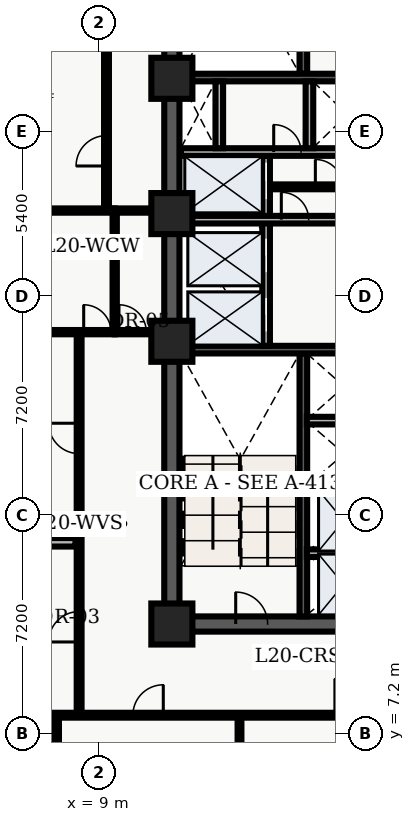
"""IFC4 building model, lengths in metres.
Left out: names, types, materials, properties, quantities, classifications, styles, units other than length and angle.
Written with IfcOpenShell. Run it as: python <this file> out.ifc"""

import sys

from ifc_helpers import new_model, entity, si_unit, converted_unit, direction, frame, origin_with_axes, origin_2d_with_axis, place, context, subcontext, project, spatial, polyline, rectangle, outline, extrude, element, fill, save


model = new_model("IFC4")
c1 = context("Model", 3, precision=1e-05, world=origin_with_axes(), true_north=direction((0.0, 1.0)))
c2 = subcontext(c1, "Body", "Model", "MODEL_VIEW")
j1 = project(units=[si_unit("LENGTHUNIT", "METRE"), converted_unit("PLANEANGLEUNIT", "DEGREE", entity("IfcPlaneAngleMeasure", 0.017), si_unit("PLANEANGLEUNIT", "RADIAN"), dimensions=[0, 0, 0, 0, 0, 0, 0])], contexts=[c1])
p1 = place(None, origin_with_axes())
s1 = spatial("IfcSite", under=j1, at=p1, CompositionType="ELEMENT")
p2 = place(p1, origin_with_axes())
s2 = spatial("IfcBuilding", under=s1, at=p2, CompositionType="ELEMENT")
p3 = place(p2, frame((0.0, 0.0, 84.6), z_axis=(0.0, 0.0, 1.0), x_axis=(1.0, 0.0, 0.0)))
s3 = spatial("IfcBuildingStorey", under=s2, at=p3, CompositionType="ELEMENT", Elevation=84.6)
p4 = place(p3, frame((11.4, 10.8, 0.0), z_axis=(0.0, 0.0, 1.0), x_axis=(0.0, 1.0, 0.0)))
e1 = element("IfcWall", 1, at=p4, inside=s3, PredefinedType="SHEAR", context=c2, shape_type="SweptSolid", body=[
    extrude(outline(polyline([(0.0, -0.25), (27.0, -0.25), (27.0, 0.25), (0.0, 0.25), (0.0, -0.25)])), origin_with_axes(), (0.0, 0.0, 1.0), 4.26),
])
p5 = place(p3, frame((11.4, 10.8, 0.0), z_axis=(0.0, 0.0, 1.0), x_axis=(1.0, 0.0, 0.0)))
e2 = element("IfcWall", 2, at=p5, inside=s3, PredefinedType="SHEAR", context=c2, shape_type="SweptSolid", body=[
    extrude(outline(polyline([(0.0, -0.25), (7.2, -0.25), (7.2, 0.25), (0.0, 0.25), (0.0, -0.25)])), origin_with_axes(), (0.0, 0.0, 1.0), 4.26),
])
p6 = place(p5, frame((2.625, 0.0, 0.0), z_axis=(0.0, 0.0, 1.0), x_axis=(1.0, 0.0, 0.0)))
e3 = element("IfcOpeningElement", 3, at=p6, cuts=e2, PredefinedType="OPENING", context=c2, shape_type="SweptSolid", body=[
    extrude(rectangle(XDim=1.05, YDim=0.52, at=origin_2d_with_axis()), origin_with_axes(), (0.0, 0.0, 1.0), 2.15),
])
p7 = place(p3, frame((15.725, 11.05, 0.0), z_axis=(0.0, 0.0, 1.0), x_axis=(0.0, 1.0, 0.0)))
e4 = element("IfcWall", 4, at=p7, inside=s3, PredefinedType="SHEAR", context=c2, shape_type="SweptSolid", body=[
    extrude(outline(polyline([(0.0, -0.125), (8.65, -0.125), (8.65, 0.125), (0.0, 0.125), (0.0, -0.125)])), origin_with_axes(), (0.0, 0.0, 1.0), 4.26),
])
p8 = place(p3, frame((11.65, 19.825, 0.0), z_axis=(0.0, 0.0, 1.0), x_axis=(1.0, 0.0, 0.0)))
e5 = element("IfcWall", 5, at=p8, inside=s3, PredefinedType="SHEAR", context=c2, shape_type="SweptSolid", body=[
    extrude(outline(polyline([(0.0, -0.125), (6.7, -0.125), (6.7, 0.125), (0.0, 0.125), (0.0, -0.125)])), origin_with_axes(), (0.0, 0.0, 1.0), 4.26),
])
p9 = place(p3, frame((15.725, 28.9, 0.0), z_axis=(0.0, 0.0, 1.0), x_axis=(0.0, 1.0, 0.0)))
e6 = element("IfcWall", 6, at=p9, inside=s3, PredefinedType="SHEAR", context=c2, shape_type="SweptSolid", body=[
    extrude(outline(polyline([(0.0, -0.125), (8.65, -0.125), (8.65, 0.125), (0.0, 0.125), (0.0, -0.125)])), origin_with_axes(), (0.0, 0.0, 1.0), 4.26),
])
p10 = place(p3, frame((11.65, 28.775, 0.0), z_axis=(0.0, 0.0, 1.0), x_axis=(1.0, 0.0, 0.0)))
e7 = element("IfcWall", 7, at=p10, inside=s3, PredefinedType="SHEAR", context=c2, shape_type="SweptSolid", body=[
    extrude(outline(polyline([(0.0, -0.125), (6.7, -0.125), (6.7, 0.125), (0.0, 0.125), (0.0, -0.125)])), origin_with_axes(), (0.0, 0.0, 1.0), 4.26),
])
p11 = place(p3, frame((14.5, 19.95, 0.0), z_axis=(0.0, 0.0, 1.0), x_axis=(0.0, 1.0, 0.0)))
e8 = element("IfcWall", 8, at=p11, inside=s3, PredefinedType="SOLIDWALL", context=c2, shape_type="SweptSolid", body=[
    extrude(outline(polyline([(0.0, -0.125), (6.25, -0.125), (6.25, 0.125), (0.0, 0.125), (0.0, -0.125)])), origin_with_axes(), (0.0, 0.0, 1.0), 3.3),
])
p12 = place(p11, frame((1.025, 0.0, 0.0), z_axis=(0.0, 0.0, 1.0), x_axis=(1.0, 0.0, 0.0)))
e9 = element("IfcOpeningElement", 9, at=p12, cuts=e8, PredefinedType="OPENING", context=c2, shape_type="SweptSolid", body=[
    extrude(rectangle(XDim=1.1, YDim=0.27, at=origin_2d_with_axis()), origin_with_axes(), (0.0, 0.0, 1.0), 2.15),
])
p13 = place(p11, frame((2.975, 0.0, 0.0), z_axis=(0.0, 0.0, 1.0), x_axis=(1.0, 0.0, 0.0)))
e10 = element("IfcOpeningElement", 10, at=p13, cuts=e8, PredefinedType="OPENING", context=c2, shape_type="SweptSolid", body=[
    extrude(rectangle(XDim=1.1, YDim=0.27, at=origin_2d_with_axis()), origin_with_axes(), (0.0, 0.0, 1.0), 2.15),
])
p14 = place(p11, frame((5.425, 0.0, 0.0), z_axis=(0.0, 0.0, 1.0), x_axis=(1.0, 0.0, 0.0)))
e11 = element("IfcOpeningElement", 11, at=p14, cuts=e8, PredefinedType="OPENING", context=c2, shape_type="SweptSolid", body=[
    extrude(rectangle(XDim=1.2, YDim=0.27, at=origin_2d_with_axis()), origin_with_axes(), (0.0, 0.0, 1.0), 2.15),
])
p15 = place(p3, frame((11.7, 24.1, 0.0), z_axis=(0.0, 0.0, 1.0), x_axis=(1.0, 0.0, 0.0)))
e12 = element("IfcWall", 12, at=p15, inside=s3, PredefinedType="SOLIDWALL", context=c2, shape_type="SweptSolid", body=[
    extrude(outline(polyline([(0.0, -0.125), (6.6, -0.125), (6.6, 0.125), (0.0, 0.125), (0.0, -0.125)])), origin_with_axes(), (0.0, 0.0, 1.0), 3.3),
])
p16 = place(p15, frame((3.75, 0.0, 0.0), z_axis=(0.0, 0.0, 1.0), x_axis=(1.0, 0.0, 0.0)))
e13 = element("IfcOpeningElement", 13, at=p16, cuts=e12, PredefinedType="OPENING", context=c2, shape_type="SweptSolid", body=[
    extrude(rectangle(XDim=0.9, YDim=0.27, at=origin_2d_with_axis()), origin_with_axes(), (0.0, 0.0, 1.0), 2.15),
])
p17 = place(p3, frame((11.7, 26.325, 0.0), z_axis=(0.0, 0.0, 1.0), x_axis=(1.0, 0.0, 0.0)))
e14 = element("IfcWall", 14, at=p17, inside=s3, PredefinedType="SOLIDWALL", context=c2, shape_type="SweptSolid", body=[
    extrude(outline(polyline([(0.0, -0.125), (6.6, -0.125), (6.6, 0.125), (0.0, 0.125), (0.0, -0.125)])), origin_with_axes(), (0.0, 0.0, 1.0), 3.3),
])
p18 = place(p17, frame((3.5, 0.0, 0.0), z_axis=(0.0, 0.0, 1.0), x_axis=(1.0, 0.0, 0.0)))
e15 = element("IfcOpeningElement", 15, at=p18, cuts=e14, PredefinedType="OPENING", context=c2, shape_type="SweptSolid", body=[
    extrude(rectangle(XDim=0.9, YDim=0.27, at=origin_2d_with_axis()), origin_with_axes(), (0.0, 0.0, 1.0), 2.15),
])
for number, where, z_axis, x_axis in (
    (16, (12.96, 26.45, 0.0), (0.0, 0.0, 1.0), (0.0, 1.0, 0.0)),
    (17, (15.925, 26.45, 0.0), (0.0, 0.0, 1.0), (0.0, 1.0, 0.0)),
):
    element("IfcWall", number, at=place(p3, frame(where, z_axis=z_axis, x_axis=x_axis)), inside=s3, PredefinedType="SOLIDWALL", context=c2, shape_type="SweptSolid", body=[
        extrude(outline(polyline([(0.0, -0.125), (2.2, -0.125), (2.2, 0.125), (0.0, 0.125), (0.0, -0.125)])), origin_with_axes(), (0.0, 0.0, 1.0), 3.3),
    ])
for number, where, z_axis, x_axis in (
    (18, (11.4, 10.8, 0.0), (0.0, 0.0, 1.0), (1.0, 0.0, 0.0)),
    (19, (11.4, 20.1, 0.0), (0.0, 0.0, 1.0), (1.0, 0.0, 0.0)),
    (20, (11.4, 24.3, 0.0), (0.0, 0.0, 1.0), (1.0, 0.0, 0.0)),
    (21, (11.4, 28.75, 0.0), (0.0, 0.0, 1.0), (1.0, 0.0, 0.0)),
):
    element("IfcColumn", number, at=place(p3, frame(where, z_axis=z_axis, x_axis=x_axis)), inside=s3, PredefinedType="COLUMN", context=c2, shape_type="SweptSolid", body=[
        extrude(rectangle(XDim=1.35, YDim=1.35, at=origin_2d_with_axis()), origin_with_axes(), (0.0, 0.0, 1.0), 4.5),
    ])
p19 = place(p3, frame((14.62, 25.18, 0.0), z_axis=(0.0, 0.0, 1.0), x_axis=(1.0, 0.0, 0.0)))
e22 = element("IfcWall", 22, at=p19, inside=s3, PredefinedType="PARTITIONING", context=c2, shape_type="SweptSolid", body=[
    extrude(outline(polyline([(0.0, -0.08), (3.68, -0.08), (3.68, 0.08), (0.0, 0.08), (0.0, -0.08)])), origin_with_axes(), (0.0, 0.0, 1.0), 3.2),
])
p20 = place(p19, frame((1.95, 0.0, 0.0), z_axis=(0.0, 0.0, 1.0), x_axis=(1.0, 0.0, 0.0)))
e23 = element("IfcOpeningElement", 23, at=p20, cuts=e22, PredefinedType="OPENING", context=c2, shape_type="SweptSolid", body=[
    extrude(rectangle(XDim=0.9, YDim=0.18, at=origin_2d_with_axis()), origin_with_axes(), (0.0, 0.0, 1.0), 2.15),
])
for number, where, z_axis, x_axis in (
    (24, (15.84, 13.13, 0.0), (0.0, 0.0, 1.0), (1.0, 0.0, 0.0)),
    (25, (15.84, 15.29, 0.0), (0.0, 0.0, 1.0), (1.0, 0.0, 0.0)),
    (26, (15.84, 17.49, 0.0), (0.0, 0.0, 1.0), (1.0, 0.0, 0.0)),
):
    element("IfcWall", number, at=place(p3, frame(where, z_axis=z_axis, x_axis=x_axis)), inside=s3, PredefinedType="SOLIDWALL", context=c2, shape_type="SweptSolid", body=[
        extrude(outline(polyline([(0.0, -0.125), (2.46, -0.125), (2.46, 0.125), (0.0, 0.125), (0.0, -0.125)])), origin_with_axes(), (0.0, 0.0, 1.0), 3.2),
    ])
p21 = place(p3, frame((9.52, 20.4, 0.0), z_axis=(0.0, 0.0, 1.0), x_axis=(0.0, 1.0, 0.0)))
e27 = element("IfcWall", 27, at=p21, inside=s3, PredefinedType="PARTITIONING", context=c2, shape_type="SweptSolid", body=[
    extrude(outline(polyline([(0.0, -0.07), (4.0, -0.07), (4.0, 0.07), (0.0, 0.07), (0.0, -0.07)])), origin_with_axes(), (0.0, 0.0, 1.0), 3.2),
])
p22 = place(p3, frame((9.52, 20.4, 0.0), z_axis=(0.0, 0.0, 1.0), x_axis=(1.0, 0.0, 0.0)))
e28 = element("IfcWall", 28, at=p22, inside=s3, PredefinedType="PARTITIONING", context=c2, shape_type="SweptSolid", body=[
    extrude(outline(polyline([(0.0, -0.07), (1.58, -0.07), (1.58, 0.07), (0.0, 0.07), (0.0, -0.07)])), origin_with_axes(), (0.0, 0.0, 1.0), 3.2),
])
p23 = place(p22, frame((0.59, 0.0, 0.0), z_axis=(0.0, 0.0, 1.0), x_axis=(1.0, 0.0, 0.0)))
e29 = element("IfcOpeningElement", 29, at=p23, cuts=e28, PredefinedType="OPENING", context=c2, shape_type="SweptSolid", body=[
    extrude(rectangle(XDim=0.9, YDim=0.16, at=origin_2d_with_axis()), origin_with_axes(), (0.0, 0.0, 1.0), 2.15),
])
p24 = place(p3, frame((9.52, 24.4, 0.0), z_axis=(0.0, 0.0, 1.0), x_axis=(1.0, 0.0, 0.0)))
e30 = element("IfcWall", 30, at=p24, inside=s3, PredefinedType="PARTITIONING", context=c2, shape_type="SweptSolid", body=[
    extrude(outline(polyline([(0.0, -0.07), (1.58, -0.07), (1.58, 0.07), (0.0, 0.07), (0.0, -0.07)])), origin_with_axes(), (0.0, 0.0, 1.0), 3.2),
])
p25 = place(p3, frame((2.6, 7.8, 0.0), z_axis=(0.0, 0.0, 1.0), x_axis=(1.0, 0.0, 0.0)))
e31 = element("IfcWall", 31, at=p25, inside=s3, PredefinedType="PARTITIONING", context=c2, shape_type="SweptSolid", body=[
    extrude(outline(polyline([(0.0, -0.08), (18.55, -0.08), (18.55, 0.08), (0.0, 0.08), (0.0, -0.08)])), origin_with_axes(), (0.0, 0.0, 1.0), 3.2),
])
p26 = place(p25, frame((2.501, 0.0, 0.0), z_axis=(0.0, 0.0, 1.0), x_axis=(1.0, 0.0, 0.0)))
e32 = element("IfcOpeningElement", 32, at=p26, cuts=e31, PredefinedType="OPENING", context=c2, shape_type="SweptSolid", body=[
    extrude(rectangle(XDim=1.0, YDim=0.18, at=origin_2d_with_axis()), origin_with_axes(), (0.0, 0.0, 1.0), 2.15),
])
p27 = place(p25, frame((8.018, 0.0, 0.0), z_axis=(0.0, 0.0, 1.0), x_axis=(1.0, 0.0, 0.0)))
e33 = element("IfcOpeningElement", 33, at=p27, cuts=e31, PredefinedType="OPENING", context=c2, shape_type="SweptSolid", body=[
    extrude(rectangle(XDim=1.0, YDim=0.18, at=origin_2d_with_axis()), origin_with_axes(), (0.0, 0.0, 1.0), 2.15),
])
p28 = place(p25, frame((14.762, 0.0, 0.0), z_axis=(0.0, 0.0, 1.0), x_axis=(1.0, 0.0, 0.0)))
e34 = element("IfcOpeningElement", 34, at=p28, cuts=e31, PredefinedType="OPENING", context=c2, shape_type="SweptSolid", body=[
    extrude(rectangle(XDim=1.2, YDim=0.18, at=origin_2d_with_axis()), origin_with_axes(), (0.0, 0.0, 1.0), 2.2),
])
p29 = place(p3, frame((8.35, 7.8, 0.0), z_axis=(0.0, 0.0, 1.0), x_axis=(0.0, 1.0, 0.0)))
e35 = element("IfcWall", 35, at=p29, inside=s3, PredefinedType="PARTITIONING", context=c2, shape_type="SweptSolid", body=[
    extrude(outline(polyline([(0.0, -0.08), (12.6, -0.08), (12.6, 0.08), (0.0, 0.08), (0.0, -0.08)])), origin_with_axes(), (0.0, 0.0, 1.0), 3.2),
])
p30 = place(p29, frame((2.909, 0.0, 0.0), z_axis=(0.0, 0.0, 1.0), x_axis=(1.0, 0.0, 0.0)))
e36 = element("IfcOpeningElement", 36, at=p30, cuts=e35, PredefinedType="OPENING", context=c2, shape_type="SweptSolid", body=[
    extrude(rectangle(XDim=1.0, YDim=0.18, at=origin_2d_with_axis()), origin_with_axes(), (0.0, 0.0, 1.0), 2.15),
])
p31 = place(p29, frame((9.104, 0.0, 0.0), z_axis=(0.0, 0.0, 1.0), x_axis=(1.0, 0.0, 0.0)))
e37 = element("IfcOpeningElement", 37, at=p31, cuts=e35, PredefinedType="OPENING", context=c2, shape_type="SweptSolid", body=[
    extrude(rectangle(XDim=1.0, YDim=0.18, at=origin_2d_with_axis()), origin_with_axes(), (0.0, 0.0, 1.0), 2.15),
])
p32 = place(p3, frame((9.25, 24.4, 0.0), z_axis=(0.0, 0.0, 1.0), x_axis=(0.0, 1.0, 0.0)))
e38 = element("IfcWall", 38, at=p32, inside=s3, PredefinedType="PARTITIONING", context=c2, shape_type="SweptSolid", body=[
    extrude(outline(polyline([(0.0, -0.08), (16.1, -0.08), (16.1, 0.08), (0.0, 0.08), (0.0, -0.08)])), origin_with_axes(), (0.0, 0.0, 1.0), 3.2),
])
p33 = place(p32, frame((1.966, 0.0, 0.0), z_axis=(0.0, 0.0, 1.0), x_axis=(1.0, 0.0, 0.0)))
e39 = element("IfcOpeningElement", 39, at=p33, cuts=e38, PredefinedType="OPENING", context=c2, shape_type="SweptSolid", body=[
    extrude(rectangle(XDim=1.0, YDim=0.18, at=origin_2d_with_axis()), origin_with_axes(), (0.0, 0.0, 1.0), 2.15),
])
p34 = place(p32, frame((11.001, 0.0, 0.0), z_axis=(0.0, 0.0, 1.0), x_axis=(1.0, 0.0, 0.0)))
e40 = element("IfcOpeningElement", 40, at=p34, cuts=e38, PredefinedType="OPENING", context=c2, shape_type="SweptSolid", body=[
    extrude(rectangle(XDim=1.0, YDim=0.18, at=origin_2d_with_axis()), origin_with_axes(), (0.0, 0.0, 1.0), 2.15),
])
p35 = place(p3, frame((0.36, 20.4, 0.0), z_axis=(0.0, 0.0, 1.0), x_axis=(1.0, 0.0, 0.0)))
e41 = element("IfcWall", 41, at=p35, inside=s3, PredefinedType="PARTITIONING", context=c2, shape_type="SweptSolid", body=[
    extrude(outline(polyline([(0.0, -0.07), (9.16, -0.07), (9.16, 0.07), (0.0, 0.07), (0.0, -0.07)])), origin_with_axes(), (0.0, 0.0, 1.0), 3.2),
])
p36 = place(p35, frame((8.59, 0.0, 0.0), z_axis=(0.0, 0.0, 1.0), x_axis=(1.0, 0.0, 0.0)))
e42 = element("IfcOpeningElement", 42, at=p36, cuts=e41, PredefinedType="OPENING", context=c2, shape_type="SweptSolid", body=[
    extrude(rectangle(XDim=0.9, YDim=0.16, at=origin_2d_with_axis()), origin_with_axes(), (0.0, 0.0, 1.0), 2.15),
])
p37 = place(p3, frame((0.36, 24.4, 0.0), z_axis=(0.0, 0.0, 1.0), x_axis=(1.0, 0.0, 0.0)))
e43 = element("IfcWall", 43, at=p37, inside=s3, PredefinedType="PARTITIONING", context=c2, shape_type="SweptSolid", body=[
    extrude(outline(polyline([(0.0, -0.07), (9.16, -0.07), (9.16, 0.07), (0.0, 0.07), (0.0, -0.07)])), origin_with_axes(), (0.0, 0.0, 1.0), 3.2),
])
p38 = place(p3, frame((0.375, 13.488, 0.0), z_axis=(0.0, 0.0, 1.0), x_axis=(1.0, 0.0, 0.0)))
e44 = element("IfcWall", 44, at=p38, inside=s3, PredefinedType="PARTITIONING", context=c2, shape_type="SweptSolid", body=[
    extrude(outline(polyline([(0.0, -0.14), (7.855, -0.14), (7.855, 0.14), (0.0, 0.14), (0.0, -0.14)])), origin_with_axes(), (0.0, 0.0, 1.0), 3.2),
])
p39 = place(p3, frame((7.611, 0.36, 0.0), z_axis=(0.0, 0.0, 1.0), x_axis=(0.0, 1.0, 0.0)))
e45 = element("IfcWall", 45, at=p39, inside=s3, PredefinedType="PARTITIONING", context=c2, shape_type="SweptSolid", body=[
    extrude(outline(polyline([(0.0, -0.075), (7.34, -0.075), (7.34, 0.075), (0.0, 0.075), (0.0, -0.075)])), origin_with_axes(), (0.0, 0.0, 1.0), 3.2),
])
p40 = place(p3, frame((13.625, 0.36, 0.0), z_axis=(0.0, 0.0, 1.0), x_axis=(0.0, 1.0, 0.0)))
e46 = element("IfcWall", 46, at=p40, inside=s3, PredefinedType="PARTITIONING", context=c2, shape_type="SweptSolid", body=[
    extrude(outline(polyline([(0.0, -0.062), (7.34, -0.062), (7.34, 0.062), (0.0, 0.062), (0.0, -0.062)])), origin_with_axes(), (0.0, 0.0, 1.0), 3.2),
])
p41 = place(p11, frame((1.025, 0.0, 0.0), z_axis=(0.0, 0.0, 1.0), x_axis=(1.0, 0.0, 0.0)))
e47 = element("IfcDoor", 47, at=p41, inside=s3, OperationType="SLIDING_TO_LEFT", PredefinedType="DOOR", context=c2, shape_type="SweptSolid", body=[
    extrude(rectangle(XDim=1.1, YDim=0.09, at=origin_2d_with_axis()), origin_with_axes(), (0.0, 0.0, 1.0), 2.15),
])
fill(e9, e47)
p42 = place(p11, frame((2.975, 0.0, 0.0), z_axis=(0.0, 0.0, 1.0), x_axis=(1.0, 0.0, 0.0)))
e48 = element("IfcDoor", 48, at=p42, inside=s3, OperationType="SLIDING_TO_RIGHT", PredefinedType="DOOR", context=c2, shape_type="SweptSolid", body=[
    extrude(rectangle(XDim=1.1, YDim=0.09, at=origin_2d_with_axis()), origin_with_axes(), (0.0, 0.0, 1.0), 2.15),
])
fill(e10, e48)
p43 = place(p11, frame((5.425, 0.0, 0.0), z_axis=(0.0, 0.0, 1.0), x_axis=(1.0, 0.0, 0.0)))
e49 = element("IfcDoor", 49, at=p43, inside=s3, OperationType="DOUBLE_DOOR_SLIDING", PredefinedType="DOOR", context=c2, shape_type="SweptSolid", body=[
    extrude(rectangle(XDim=1.2, YDim=0.09, at=origin_2d_with_axis()), origin_with_axes(), (0.0, 0.0, 1.0), 2.15),
])
fill(e11, e49)
p44 = place(p5, frame((2.625, 0.0, 0.0), z_axis=(0.0, 0.0, 1.0), x_axis=(1.0, 0.0, 0.0)))
e50 = element("IfcDoor", 50, at=p44, inside=s3, OperationType="SINGLE_SWING_LEFT", PredefinedType="DOOR", context=c2, shape_type="SweptSolid", body=[
    extrude(rectangle(XDim=1.05, YDim=0.09, at=origin_2d_with_axis()), origin_with_axes(), (0.0, 0.0, 1.0), 2.15),
])
fill(e3, e50)
p45 = place(p17, frame((3.5, 0.0, 0.0), z_axis=(0.0, 0.0, 1.0), x_axis=(1.0, 0.0, 0.0)))
e51 = element("IfcDoor", 51, at=p45, inside=s3, OperationType="SINGLE_SWING_LEFT", PredefinedType="DOOR", context=c2, shape_type="SweptSolid", body=[
    extrude(rectangle(XDim=0.9, YDim=0.09, at=origin_2d_with_axis()), origin_with_axes(), (0.0, 0.0, 1.0), 2.15),
])
fill(e15, e51)
p46 = place(p15, frame((3.75, 0.0, 0.0), z_axis=(0.0, 0.0, 1.0), x_axis=(1.0, 0.0, 0.0)))
e52 = element("IfcDoor", 52, at=p46, inside=s3, OperationType="SINGLE_SWING_LEFT", PredefinedType="DOOR", context=c2, shape_type="SweptSolid", body=[
    extrude(rectangle(XDim=0.9, YDim=0.09, at=origin_2d_with_axis()), origin_with_axes(), (0.0, 0.0, 1.0), 2.15),
])
fill(e13, e52)
p47 = place(p19, frame((1.95, 0.0, 0.0), z_axis=(0.0, 0.0, 1.0), x_axis=(1.0, 0.0, 0.0)))
e53 = element("IfcDoor", 53, at=p47, inside=s3, OperationType="SINGLE_SWING_LEFT", PredefinedType="DOOR", context=c2, shape_type="SweptSolid", body=[
    extrude(rectangle(XDim=0.9, YDim=0.09, at=origin_2d_with_axis()), origin_with_axes(), (0.0, 0.0, 1.0), 2.15),
])
fill(e23, e53)
p48 = place(p22, frame((0.59, 0.0, 0.0), z_axis=(0.0, 0.0, 1.0), x_axis=(1.0, 0.0, 0.0)))
e54 = element("IfcDoor", 54, at=p48, inside=s3, OperationType="SINGLE_SWING_LEFT", PredefinedType="DOOR", context=c2, shape_type="SweptSolid", body=[
    extrude(rectangle(XDim=0.9, YDim=0.084, at=origin_2d_with_axis()), origin_with_axes(), (0.0, 0.0, 1.0), 2.15),
])
fill(e29, e54)
p49 = place(p35, frame((8.59, 0.0, 0.0), z_axis=(0.0, 0.0, 1.0), x_axis=(1.0, 0.0, 0.0)))
e55 = element("IfcDoor", 55, at=p49, inside=s3, OperationType="SINGLE_SWING_LEFT", PredefinedType="DOOR", context=c2, shape_type="SweptSolid", body=[
    extrude(rectangle(XDim=0.9, YDim=0.084, at=origin_2d_with_axis()), origin_with_axes(), (0.0, 0.0, 1.0), 2.15),
])
fill(e42, e55)
p50 = place(p29, frame((2.909, 0.0, 0.0), z_axis=(0.0, 0.0, 1.0), x_axis=(1.0, 0.0, 0.0)))
e56 = element("IfcDoor", 56, at=p50, inside=s3, OperationType="SINGLE_SWING_LEFT", PredefinedType="DOOR", context=c2, shape_type="SweptSolid", body=[
    extrude(rectangle(XDim=1.0, YDim=0.09, at=origin_2d_with_axis()), origin_with_axes(), (0.0, 0.0, 1.0), 2.15),
])
fill(e36, e56)
p51 = place(p29, frame((9.104, 0.0, 0.0), z_axis=(0.0, 0.0, 1.0), x_axis=(1.0, 0.0, 0.0)))
e57 = element("IfcDoor", 57, at=p51, inside=s3, OperationType="SINGLE_SWING_RIGHT", PredefinedType="DOOR", context=c2, shape_type="SweptSolid", body=[
    extrude(rectangle(XDim=1.0, YDim=0.09, at=origin_2d_with_axis()), origin_with_axes(), (0.0, 0.0, 1.0), 2.15),
])
fill(e37, e57)
p52 = place(p32, frame((1.966, 0.0, 0.0), z_axis=(0.0, 0.0, 1.0), x_axis=(1.0, 0.0, 0.0)))
e58 = element("IfcDoor", 58, at=p52, inside=s3, OperationType="SINGLE_SWING_LEFT", PredefinedType="DOOR", context=c2, shape_type="SweptSolid", body=[
    extrude(rectangle(XDim=1.0, YDim=0.09, at=origin_2d_with_axis()), origin_with_axes(), (0.0, 0.0, 1.0), 2.15),
])
fill(e39, e58)
p53 = place(p25, frame((8.018, 0.0, 0.0), z_axis=(0.0, 0.0, 1.0), x_axis=(1.0, 0.0, 0.0)))
e59 = element("IfcDoor", 59, at=p53, inside=s3, OperationType="SINGLE_SWING_RIGHT", PredefinedType="DOOR", context=c2, shape_type="SweptSolid", body=[
    extrude(rectangle(XDim=1.0, YDim=0.09, at=origin_2d_with_axis()), origin_with_axes(), (0.0, 0.0, 1.0), 2.15),
])
fill(e33, e59)
p54 = place(p25, frame((14.762, 0.0, 0.0), z_axis=(0.0, 0.0, 1.0), x_axis=(1.0, 0.0, 0.0)))
e60 = element("IfcDoor", 60, at=p54, inside=s3, OperationType="SINGLE_SWING_LEFT", PredefinedType="DOOR", context=c2, shape_type="SweptSolid", body=[
    extrude(rectangle(XDim=1.2, YDim=0.09, at=origin_2d_with_axis()), origin_with_axes(), (0.0, 0.0, 1.0), 2.2),
])
fill(e34, e60)
save(model, sys.argv[1])
